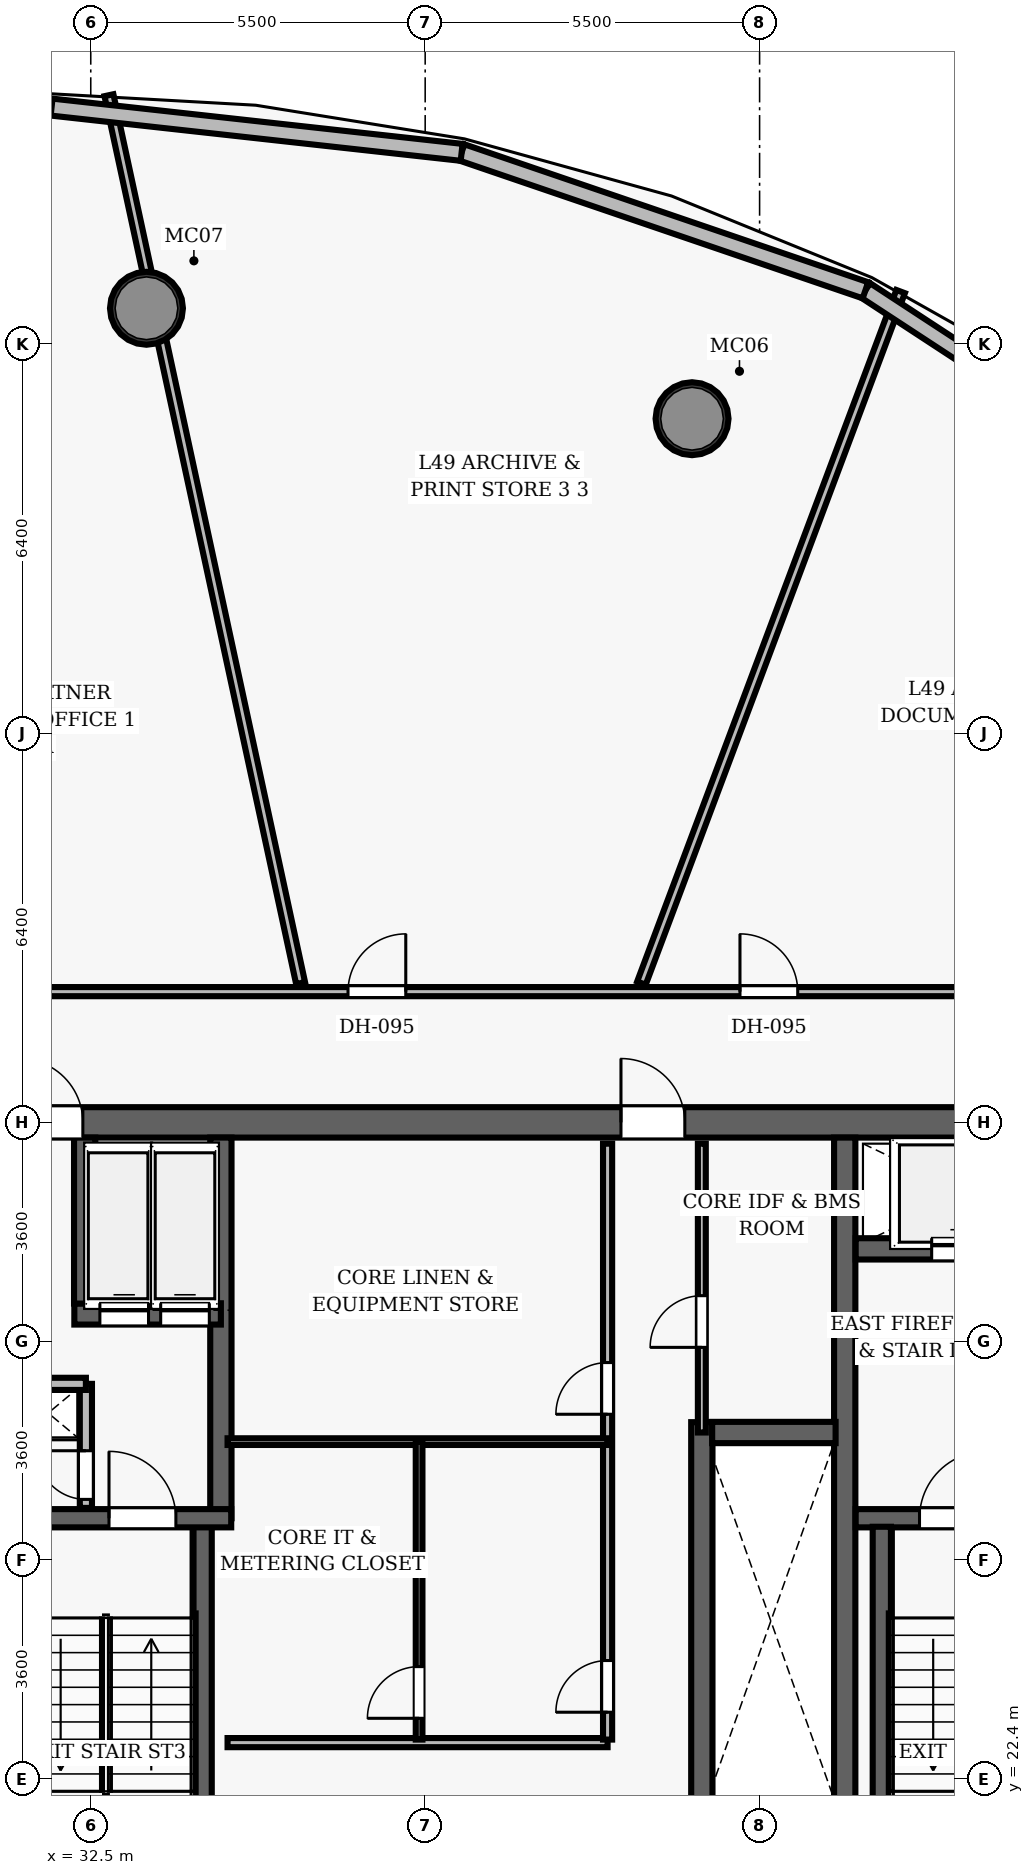
"""IFC4 building model, lengths in metres.
Left out: names, types, materials, properties, quantities, classifications, styles, units other than length and angle.
Written with IfcOpenShell. Run it as: python <this file> out.ifc"""

import sys

from ifc_helpers import new_model, si_unit, direction, frame, frame_2d, origin, origin_2d, place, context, subcontext, project, spatial, rectangle, hollow_circle, extrude, element, fill, save


model = new_model("IFC4")
c1 = context("Model", 3, precision=1e-05, world=origin(), true_north=direction((0.0, 1.0)))
c2 = subcontext(c1, "Body", "Model", "MODEL_VIEW")
j1 = project(units=[si_unit("LENGTHUNIT", "METRE"), si_unit("PLANEANGLEUNIT", "RADIAN")], contexts=[c1])
p1 = place(None, origin())
s1 = spatial("IfcSite", under=j1, at=p1, CompositionType="ELEMENT")
p2 = place(p1, origin())
s2 = spatial("IfcBuilding", under=s1, at=p2, CompositionType="ELEMENT")
p3 = place(p2, frame((0.0, 0.0, 194.3)))
s3 = spatial("IfcBuildingStorey", under=s2, at=p3, CompositionType="ELEMENT", Elevation=194.3)
p4 = place(p3, frame((26.75, 33.2, 0.0), z_axis=(0.0, 0.0, 1.0), x_axis=(1.0, 0.0, 0.0)))
e1 = element("IfcWall", 1, at=p4, inside=s3, PredefinedType="SHEAR", context=c2, shape_type="SweptSolid", body=[
    extrude(rectangle(XDim=22.5, YDim=0.5, at=frame_2d((11.25, 0.0))), origin(), (0.0, 0.0, 1.0), 3.85),
])
p5 = place(p4, frame((4.57, 0.0, 0.0)))
e2 = element("IfcOpeningElement", 2, at=p5, cuts=e1, PredefinedType="OPENING", context=c2, shape_type="SweptSolid", body=[
    extrude(rectangle(XDim=1.05, YDim=2.15, at=frame_2d((0.525, 1.075))), frame((0.0, 0.26, 0.0), z_axis=(0.0, -1.0, 0.0), x_axis=(1.0, 0.0, 0.0)), (0.0, 0.0, 1.0), 0.52),
])
p6 = place(p4, frame((14.47, 0.0, 0.0)))
e3 = element("IfcOpeningElement", 3, at=p6, cuts=e1, PredefinedType="OPENING", context=c2, shape_type="SweptSolid", body=[
    extrude(rectangle(XDim=1.05, YDim=2.15, at=frame_2d((0.525, 1.075))), frame((0.0, 0.26, 0.0), z_axis=(0.0, -1.0, 0.0), x_axis=(1.0, 0.0, 0.0)), (0.0, 0.0, 1.0), 0.52),
])
p7 = place(p3, frame((44.9, 19.05, 0.0), z_axis=(0.0, 0.0, 1.0), x_axis=(0.0, 1.0, 0.0)))
e4 = element("IfcWall", 4, at=p7, inside=s3, PredefinedType="SHEAR", context=c2, shape_type="SweptSolid", body=[
    extrude(rectangle(XDim=13.9, YDim=0.35, at=frame_2d((6.95, 0.0))), origin(), (0.0, 0.0, 1.0), 3.85),
])
for number, where, z_axis, x_axis in (
    (5, (42.389, 44.772, 0.0), (0.0, 0.0, 1.0), (1.0, 0.0, 0.0)),
    (6, (33.416, 46.588, 0.0), (0.0, 0.0, 1.0), (1.0, 0.0, 0.0)),
):
    element("IfcColumn", number, at=place(p3, frame(where, z_axis=z_axis, x_axis=x_axis)), inside=s3, PredefinedType="COLUMN", context=c2, shape_type="SweptSolid", body=[
        extrude(hollow_circle(Radius=0.6, WallThickness=0.05, at=origin_2d()), origin(), (0.0, 0.0, 1.0), 3.85),
    ])
p8 = place(p3, frame((45.08, 26.69, 0.0), z_axis=(0.0, 0.0, 1.0), x_axis=(1.0, 0.0, 0.0)))
e7 = element("IfcWall", 7, at=p8, inside=s3, PredefinedType="SHEAR", context=c2, shape_type="SweptSolid", body=[
    extrude(rectangle(XDim=3.67, YDim=0.3, at=frame_2d((1.835, 0.0))), origin(), (0.0, 0.0, 1.0), 3.85),
])
p9 = place(p8, frame((1.05, 0.0, 0.0)))
e8 = element("IfcOpeningElement", 8, at=p9, cuts=e7, PredefinedType="OPENING", context=c2, shape_type="SweptSolid", body=[
    extrude(rectangle(XDim=1.1, YDim=2.15, at=frame_2d((0.55, 1.075))), frame((0.0, 0.16, 0.0), z_axis=(0.0, -1.0, 0.0), x_axis=(1.0, 0.0, 0.0)), (0.0, 0.0, 1.0), 0.32),
])
p10 = place(p3, frame((45.51, 19.05, 0.0), z_axis=(0.0, 0.0, 1.0), x_axis=(0.0, 1.0, 0.0)))
e9 = element("IfcWall", 9, at=p10, inside=s3, PredefinedType="SHEAR", context=c2, shape_type="SweptSolid", body=[
    extrude(rectangle(XDim=7.5, YDim=0.3, at=frame_2d((3.75, 0.0))), origin(), (0.0, 0.0, 1.0), 3.85),
])
p11 = place(p3, frame((45.08, 31.12, 0.0), z_axis=(0.0, 0.0, 1.0), x_axis=(1.0, 0.0, 0.0)))
e10 = element("IfcWall", 10, at=p11, inside=s3, PredefinedType="SHEAR", context=c2, shape_type="SweptSolid", body=[
    extrude(rectangle(XDim=3.67, YDim=0.35, at=frame_2d((1.835, 0.0))), origin(), (0.0, 0.0, 1.0), 3.035),
])
p12 = place(p11, frame((1.25, 0.0, 0.0)))
e11 = element("IfcOpeningElement", 11, at=p12, cuts=e10, PredefinedType="OPENING", context=c2, shape_type="SweptSolid", body=[
    extrude(rectangle(XDim=1.1, YDim=2.15, at=frame_2d((0.55, 1.075))), frame((0.0, 0.185, 0.0), z_axis=(0.0, -1.0, 0.0), x_axis=(1.0, 0.0, 0.0)), (0.0, 0.0, 1.0), 0.37),
])
p13 = place(p3, frame((34.34, 19.05, 0.0), z_axis=(0.0, 0.0, 1.0), x_axis=(0.0, 1.0, 0.0)))
e12 = element("IfcWall", 12, at=p13, inside=s3, PredefinedType="SHEAR", context=c2, shape_type="SweptSolid", body=[
    extrude(rectangle(XDim=7.5, YDim=0.3, at=frame_2d((3.75, 0.0))), origin(), (0.0, 0.0, 1.0), 3.85),
])
p14 = place(p3, frame((34.64, 26.69, 0.0), z_axis=(0.0, 0.0, 1.0), x_axis=(0.0, 1.0, 0.0)))
e13 = element("IfcWall", 13, at=p14, inside=s3, PredefinedType="SHEAR", context=c2, shape_type="SweptSolid", body=[
    extrude(rectangle(XDim=6.26, YDim=0.35, at=frame_2d((3.13, 0.0))), origin(), (0.0, 0.0, 1.0), 3.85),
])
p15 = place(p3, frame((31.25, 26.69, 0.0), z_axis=(0.0, 0.0, 1.0), x_axis=(1.0, 0.0, 0.0)))
e14 = element("IfcWall", 14, at=p15, inside=s3, PredefinedType="SHEAR", context=c2, shape_type="SweptSolid", body=[
    extrude(rectangle(XDim=3.56, YDim=0.3, at=frame_2d((1.78, 0.0))), origin(), (0.0, 0.0, 1.0), 3.85),
])
p16 = place(p15, frame((1.55, 0.0, 0.0)))
e15 = element("IfcOpeningElement", 15, at=p16, cuts=e14, PredefinedType="OPENING", context=c2, shape_type="SweptSolid", body=[
    extrude(rectangle(XDim=1.1, YDim=2.15, at=frame_2d((0.55, 1.075))), frame((0.0, 0.16, 0.0), z_axis=(0.0, -1.0, 0.0), x_axis=(1.0, 0.0, 0.0)), (0.0, 0.0, 1.0), 0.32),
])
p17 = place(p3, frame((32.23, 30.05, 0.0), z_axis=(0.0, 0.0, 1.0), x_axis=(1.0, 0.0, 0.0)))
e16 = element("IfcWall", 16, at=p17, inside=s3, PredefinedType="SHEAR", context=c2, shape_type="SweptSolid", body=[
    extrude(rectangle(XDim=2.41, YDim=0.35, at=frame_2d((1.205, 0.0))), origin(), (0.0, 0.0, 1.0), 3.035),
])
p18 = place(p17, frame((0.42, 0.0, 0.0)))
e17 = element("IfcOpeningElement", 17, at=p18, cuts=e16, PredefinedType="OPENING", context=c2, shape_type="SweptSolid", body=[
    extrude(rectangle(XDim=0.8, YDim=2.15, at=frame_2d((0.4, 1.075))), frame((0.0, 0.185, 0.0), z_axis=(0.0, -1.0, 0.0), x_axis=(1.0, 0.0, 0.0)), (0.0, 0.0, 1.0), 0.37),
])
p19 = place(p17, frame((1.42, 0.0, 0.0)))
e18 = element("IfcOpeningElement", 18, at=p19, cuts=e16, PredefinedType="OPENING", context=c2, shape_type="SweptSolid", body=[
    extrude(rectangle(XDim=0.8, YDim=2.15, at=frame_2d((0.4, 1.075))), frame((0.0, 0.185, 0.0), z_axis=(0.0, -1.0, 0.0), x_axis=(1.0, 0.0, 0.0)), (0.0, 0.0, 1.0), 0.37),
])
p20 = place(p3, frame((32.4, 30.22, 0.0), z_axis=(0.0, 0.0, 1.0), x_axis=(0.0, 1.0, 0.0)))
e19 = element("IfcWall", 19, at=p20, inside=s3, PredefinedType="SHEAR", context=c2, shape_type="SweptSolid", body=[
    extrude(rectangle(XDim=2.73, YDim=0.35, at=frame_2d((1.365, 0.0))), origin(), (0.0, 0.0, 1.0), 3.035),
])
p21 = place(p3, frame((32.42, 26.86, 0.0), z_axis=(0.0, 0.0, 1.0), x_axis=(0.0, 1.0, 0.0)))
e20 = element("IfcWall", 20, at=p21, inside=s3, PredefinedType="PARTITIONING", context=c2, shape_type="SweptSolid", body=[
    extrude(rectangle(XDim=2.04, YDim=0.2, at=frame_2d((1.02, 0.0))), origin(), (0.0, 0.0, 1.0), 3.035),
])
p22 = place(p21, frame((0.14, 0.0, 0.0)))
e21 = element("IfcOpeningElement", 21, at=p22, cuts=e20, PredefinedType="OPENING", context=c2, shape_type="SweptSolid", body=[
    extrude(rectangle(XDim=0.8, YDim=2.05, at=frame_2d((0.4, 1.025))), frame((0.0, 0.11, 0.0), z_axis=(0.0, -1.0, 0.0), x_axis=(1.0, 0.0, 0.0)), (0.0, 0.0, 1.0), 0.22),
])
p23 = place(p3, frame((31.3, 28.9, 0.0), z_axis=(0.0, 0.0, 1.0), x_axis=(1.0, 0.0, 0.0)))
e22 = element("IfcWall", 22, at=p23, inside=s3, PredefinedType="PARTITIONING", context=c2, shape_type="SweptSolid", body=[
    extrude(rectangle(XDim=1.12, YDim=0.2, at=frame_2d((0.56, 0.0))), origin(), (0.0, 0.0, 1.0), 3.035),
])
p24 = place(p3, frame((42.55, 21.73, 0.0), z_axis=(0.0, 0.0, 1.0), x_axis=(0.0, 1.0, 0.0)))
e23 = element("IfcWall", 23, at=p24, inside=s3, PredefinedType="SHEAR", context=c2, shape_type="SweptSolid", body=[
    extrude(rectangle(XDim=6.54, YDim=0.35, at=frame_2d((3.27, 0.0))), origin(), (0.0, 0.0, 1.0), 3.035),
])
p25 = place(p3, frame((42.72, 28.1, 0.0), z_axis=(0.0, 0.0, 1.0), x_axis=(1.0, 0.0, 0.0)))
e24 = element("IfcWall", 24, at=p25, inside=s3, PredefinedType="SHEAR", context=c2, shape_type="SweptSolid", body=[
    extrude(rectangle(XDim=2.03, YDim=0.35, at=frame_2d((1.015, 0.0))), origin(), (0.0, 0.0, 1.0), 3.035),
])
p26 = place(p3, frame((34.75, 23.0, 0.0), z_axis=(0.0, 0.0, 1.0), x_axis=(1.0, 0.0, 0.0)))
e25 = element("IfcWall", 25, at=p26, inside=s3, PredefinedType="PARTITIONING", context=c2, shape_type="SweptSolid", body=[
    extrude(rectangle(XDim=6.25, YDim=0.15, at=frame_2d((3.125, 0.0))), origin(), (0.0, 0.0, 1.0), 3.035),
])
p27 = place(p3, frame((41.0, 23.05, 0.0), z_axis=(0.0, 0.0, 1.0), x_axis=(0.0, 1.0, 0.0)))
e26 = element("IfcWall", 26, at=p27, inside=s3, PredefinedType="PARTITIONING", context=c2, shape_type="SweptSolid", body=[
    extrude(rectangle(XDim=9.8, YDim=0.15, at=frame_2d((4.9, 0.0))), origin(), (0.0, 0.0, 1.0), 3.035),
])
p28 = place(p27, frame((5.35, 0.0, 0.0)))
e27 = element("IfcOpeningElement", 27, at=p28, cuts=e26, PredefinedType="OPENING", context=c2, shape_type="SweptSolid", body=[
    extrude(rectangle(XDim=0.85, YDim=2.1, at=frame_2d((0.425, 1.05))), frame((0.0, 0.085, 0.0), z_axis=(0.0, -1.0, 0.0), x_axis=(1.0, 0.0, 0.0)), (0.0, 0.0, 1.0), 0.17),
])
p29 = place(p27, frame((0.45, 0.0, 0.0)))
e28 = element("IfcOpeningElement", 28, at=p29, cuts=e26, PredefinedType="OPENING", context=c2, shape_type="SweptSolid", body=[
    extrude(rectangle(XDim=0.85, YDim=2.1, at=frame_2d((0.425, 1.05))), frame((0.0, 0.085, 0.0), z_axis=(0.0, -1.0, 0.0), x_axis=(1.0, 0.0, 0.0)), (0.0, 0.0, 1.0), 0.17),
])
p30 = place(p3, frame((34.75, 27.95, 0.0), z_axis=(0.0, 0.0, 1.0), x_axis=(1.0, 0.0, 0.0)))
e29 = element("IfcWall", 29, at=p30, inside=s3, PredefinedType="PARTITIONING", context=c2, shape_type="SweptSolid", body=[
    extrude(rectangle(XDim=6.25, YDim=0.11, at=frame_2d((3.125, 0.0))), origin(), (0.0, 0.0, 1.0), 3.035),
])
p31 = place(p3, frame((37.9, 23.05, 0.0), z_axis=(0.0, 0.0, 1.0), x_axis=(0.0, 1.0, 0.0)))
e30 = element("IfcWall", 30, at=p31, inside=s3, PredefinedType="PARTITIONING", context=c2, shape_type="SweptSolid", body=[
    extrude(rectangle(XDim=4.9, YDim=0.11, at=frame_2d((2.45, 0.0))), origin(), (0.0, 0.0, 1.0), 3.035),
])
p32 = place(p31, frame((0.35, 0.0, 0.0)))
e31 = element("IfcOpeningElement", 31, at=p32, cuts=e30, PredefinedType="OPENING", context=c2, shape_type="SweptSolid", body=[
    extrude(rectangle(XDim=0.85, YDim=2.1, at=frame_2d((0.425, 1.05))), frame((0.0, 0.065, 0.0), z_axis=(0.0, -1.0, 0.0), x_axis=(1.0, 0.0, 0.0)), (0.0, 0.0, 1.0), 0.13),
])
p33 = place(p3, frame((42.55, 28.1, 0.0), z_axis=(0.0, 0.0, 1.0), x_axis=(0.0, 1.0, 0.0)))
e32 = element("IfcWall", 32, at=p33, inside=s3, PredefinedType="PARTITIONING", context=c2, shape_type="SweptSolid", body=[
    extrude(rectangle(XDim=4.75, YDim=0.13, at=frame_2d((2.375, 0.0))), origin(), (0.0, 0.0, 1.0), 3.035),
])
p34 = place(p33, frame((1.4, 0.0, 0.0)))
e33 = element("IfcOpeningElement", 33, at=p34, cuts=e32, PredefinedType="OPENING", context=c2, shape_type="SweptSolid", body=[
    extrude(rectangle(XDim=0.85, YDim=2.1, at=frame_2d((0.425, 1.05))), frame((0.0, 0.075, 0.0), z_axis=(0.0, -1.0, 0.0), x_axis=(1.0, 0.0, 0.0)), (0.0, 0.0, 1.0), 0.15),
])
p35 = place(p3, frame((24.85, 35.35, 0.0), z_axis=(0.0, 0.0, 1.0), x_axis=(1.0, 0.0, 0.0)))
e34 = element("IfcWall", 34, at=p35, inside=s3, PredefinedType="PARTITIONING", context=c2, shape_type="SweptSolid", body=[
    extrude(rectangle(XDim=26.0, YDim=0.15, at=frame_2d((13.0, 0.0))), origin(), (0.0, 0.0, 1.0), 3.035),
])
p36 = place(p35, frame((18.327, 0.0, 0.0)))
e35 = element("IfcOpeningElement", 35, at=p36, cuts=e34, PredefinedType="OPENING", context=c2, shape_type="SweptSolid", body=[
    extrude(rectangle(XDim=0.95, YDim=2.15, at=frame_2d((0.475, 1.075))), frame((0.0, 0.085, 0.0), z_axis=(0.0, -1.0, 0.0), x_axis=(1.0, 0.0, 0.0)), (0.0, 0.0, 1.0), 0.17),
])
p37 = place(p35, frame((11.881, 0.0, 0.0)))
e36 = element("IfcOpeningElement", 36, at=p37, cuts=e34, PredefinedType="OPENING", context=c2, shape_type="SweptSolid", body=[
    extrude(rectangle(XDim=0.95, YDim=2.15, at=frame_2d((0.475, 1.075))), frame((0.0, 0.085, 0.0), z_axis=(0.0, -1.0, 0.0), x_axis=(1.0, 0.0, 0.0)), (0.0, 0.0, 1.0), 0.17),
])
p38 = place(p35, frame((5.711, 0.0, 0.0)))
e37 = element("IfcOpeningElement", 37, at=p38, cuts=e34, PredefinedType="OPENING", context=c2, shape_type="SweptSolid", body=[
    extrude(rectangle(XDim=0.95, YDim=2.15, at=frame_2d((0.475, 1.075))), frame((0.0, 0.085, 0.0), z_axis=(0.0, -1.0, 0.0), x_axis=(1.0, 0.0, 0.0)), (0.0, 0.0, 1.0), 0.17),
])
p39 = place(p3, frame((41.557, 35.49, 0.0), z_axis=(0.0, 0.0, 1.0), x_axis=(0.350958224888, 0.936391117206, 0.0)))
e38 = element("IfcWall", 38, at=p39, inside=s3, PredefinedType="PARTITIONING", context=c2, shape_type="SweptSolid", body=[
    extrude(rectangle(XDim=12.146, YDim=0.15, at=frame_2d((6.073, 0.0))), origin(), (0.0, 0.0, 1.0), 3.035),
])
p40 = place(p3, frame((35.951, 35.49, 0.0), z_axis=(0.0, 0.0, 1.0), x_axis=(-0.211018834745, 0.977481995426, 0.0)))
e39 = element("IfcWall", 39, at=p40, inside=s3, PredefinedType="PARTITIONING", context=c2, shape_type="SweptSolid", body=[
    extrude(rectangle(XDim=14.939, YDim=0.15, at=frame_2d((7.469, 0.0))), origin(), (0.0, 0.0, 1.0), 3.035),
])
p41 = place(p3, frame((45.24, 46.884, 0.0), z_axis=(0.0, 0.0, 1.0), x_axis=(0.836722302194, -0.547627418059, 0.0)))
e40 = element("IfcWall", 40, at=p41, inside=s3, PredefinedType="SOLIDWALL", context=c2, shape_type="SweptSolid", body=[
    extrude(rectangle(XDim=7.046, YDim=0.28, at=frame_2d((3.523, 0.0))), origin(), (0.0, 0.0, 1.0), 3.62),
])
p42 = place(p3, frame((38.6, 49.152, 0.0), z_axis=(0.0, 0.0, 1.0), x_axis=(0.946319491837, -0.323232763452, 0.0)))
e41 = element("IfcWall", 41, at=p42, inside=s3, PredefinedType="SOLIDWALL", context=c2, shape_type="SweptSolid", body=[
    extrude(rectangle(XDim=7.018, YDim=0.28, at=frame_2d((3.509, 0.0))), origin(), (0.0, 0.0, 1.0), 3.62),
])
p43 = place(p3, frame((31.856, 49.896, 0.0), z_axis=(0.0, 0.0, 1.0), x_axis=(0.993966830352, -0.109681083879, 0.0)))
e42 = element("IfcWall", 42, at=p43, inside=s3, PredefinedType="SOLIDWALL", context=c2, shape_type="SweptSolid", body=[
    extrude(rectangle(XDim=6.785, YDim=0.28, at=frame_2d((3.392, 0.0))), origin(), (0.0, 0.0, 1.0), 3.62),
])
p44 = place(p9, origin())
e43 = element("IfcDoor", 43, at=p44, inside=s3, OperationType="SINGLE_SWING_RIGHT", PredefinedType="DOOR", context=c2, shape_type="SweptSolid", body=[
    extrude(rectangle(XDim=1.1, YDim=2.15, at=frame_2d((0.55, 1.075))), frame((0.0, 0.025, 0.0), z_axis=(0.0, -1.0, 0.0), x_axis=(1.0, 0.0, 0.0)), (0.0, 0.0, 1.0), 0.05),
])
fill(e8, e43)
p45 = place(p16, origin())
e44 = element("IfcDoor", 44, at=p45, inside=s3, OperationType="SINGLE_SWING_LEFT", PredefinedType="DOOR", context=c2, shape_type="SweptSolid", body=[
    extrude(rectangle(XDim=1.1, YDim=2.15, at=frame_2d((0.55, 1.075))), frame((0.0, 0.025, 0.0), z_axis=(0.0, -1.0, 0.0), x_axis=(1.0, 0.0, 0.0)), (0.0, 0.0, 1.0), 0.05),
])
fill(e15, e44)
p46 = place(p22, origin())
e45 = element("IfcDoor", 45, at=p46, inside=s3, OperationType="SINGLE_SWING_RIGHT", PredefinedType="DOOR", context=c2, shape_type="SweptSolid", body=[
    extrude(rectangle(XDim=0.8, YDim=2.05, at=frame_2d((0.4, 1.025))), frame((0.0, 0.025, 0.0), z_axis=(0.0, -1.0, 0.0), x_axis=(1.0, 0.0, 0.0)), (0.0, 0.0, 1.0), 0.05),
])
fill(e21, e45)
p47 = place(p5, origin())
e46 = element("IfcDoor", 46, at=p47, inside=s3, OperationType="SINGLE_SWING_LEFT", PredefinedType="DOOR", context=c2, shape_type="SweptSolid", body=[
    extrude(rectangle(XDim=1.05, YDim=2.15, at=frame_2d((0.525, 1.075))), frame((0.0, 0.025, 0.0), z_axis=(0.0, -1.0, 0.0), x_axis=(1.0, 0.0, 0.0)), (0.0, 0.0, 1.0), 0.05),
])
fill(e2, e46)
p48 = place(p6, origin())
e47 = element("IfcDoor", 47, at=p48, inside=s3, OperationType="SINGLE_SWING_LEFT", PredefinedType="DOOR", context=c2, shape_type="SweptSolid", body=[
    extrude(rectangle(XDim=1.05, YDim=2.15, at=frame_2d((0.525, 1.075))), frame((0.0, 0.025, 0.0), z_axis=(0.0, -1.0, 0.0), x_axis=(1.0, 0.0, 0.0)), (0.0, 0.0, 1.0), 0.05),
])
fill(e3, e47)
p49 = place(p28, origin())
e48 = element("IfcDoor", 48, at=p49, inside=s3, OperationType="SINGLE_SWING_LEFT", PredefinedType="DOOR", context=c2, shape_type="SweptSolid", body=[
    extrude(rectangle(XDim=0.85, YDim=2.1, at=frame_2d((0.425, 1.05))), frame((0.0, 0.025, 0.0), z_axis=(0.0, -1.0, 0.0), x_axis=(1.0, 0.0, 0.0)), (0.0, 0.0, 1.0), 0.05),
])
fill(e27, e48)
p50 = place(p29, origin())
e49 = element("IfcDoor", 49, at=p50, inside=s3, OperationType="SINGLE_SWING_LEFT", PredefinedType="DOOR", context=c2, shape_type="SweptSolid", body=[
    extrude(rectangle(XDim=0.85, YDim=2.1, at=frame_2d((0.425, 1.05))), frame((0.0, 0.025, 0.0), z_axis=(0.0, -1.0, 0.0), x_axis=(1.0, 0.0, 0.0)), (0.0, 0.0, 1.0), 0.05),
])
fill(e28, e49)
p51 = place(p32, origin())
e50 = element("IfcDoor", 50, at=p51, inside=s3, OperationType="SINGLE_SWING_LEFT", PredefinedType="DOOR", context=c2, shape_type="SweptSolid", body=[
    extrude(rectangle(XDim=0.85, YDim=2.1, at=frame_2d((0.425, 1.05))), frame((0.0, 0.025, 0.0), z_axis=(0.0, -1.0, 0.0), x_axis=(1.0, 0.0, 0.0)), (0.0, 0.0, 1.0), 0.05),
])
fill(e31, e50)
p52 = place(p34, origin())
e51 = element("IfcDoor", 51, at=p52, inside=s3, OperationType="SINGLE_SWING_LEFT", PredefinedType="DOOR", context=c2, shape_type="SweptSolid", body=[
    extrude(rectangle(XDim=0.85, YDim=2.1, at=frame_2d((0.425, 1.05))), frame((0.0, 0.025, 0.0), z_axis=(0.0, -1.0, 0.0), x_axis=(1.0, 0.0, 0.0)), (0.0, 0.0, 1.0), 0.05),
])
fill(e33, e51)
p53 = place(p36, origin())
e52 = element("IfcDoor", 52, at=p53, inside=s3, OperationType="SINGLE_SWING_LEFT", PredefinedType="DOOR", context=c2, shape_type="SweptSolid", body=[
    extrude(rectangle(XDim=0.95, YDim=2.15, at=frame_2d((0.475, 1.075))), frame((0.0, 0.025, 0.0), z_axis=(0.0, -1.0, 0.0), x_axis=(1.0, 0.0, 0.0)), (0.0, 0.0, 1.0), 0.05),
])
fill(e35, e52)
p54 = place(p37, origin())
e53 = element("IfcDoor", 53, at=p54, inside=s3, OperationType="SINGLE_SWING_RIGHT", PredefinedType="DOOR", context=c2, shape_type="SweptSolid", body=[
    extrude(rectangle(XDim=0.95, YDim=2.15, at=frame_2d((0.475, 1.075))), frame((0.0, 0.025, 0.0), z_axis=(0.0, -1.0, 0.0), x_axis=(1.0, 0.0, 0.0)), (0.0, 0.0, 1.0), 0.05),
])
fill(e36, e53)
p55 = place(p12, origin())
e54 = element("IfcDoor", 54, at=p55, inside=s3, OperationType="SLIDING_TO_LEFT", PredefinedType="DOOR", context=c2, shape_type="SweptSolid", body=[
    extrude(rectangle(XDim=1.1, YDim=2.15, at=frame_2d((0.55, 1.075))), frame((0.0, 0.025, 0.0), z_axis=(0.0, -1.0, 0.0), x_axis=(1.0, 0.0, 0.0)), (0.0, 0.0, 1.0), 0.05),
])
fill(e11, e54)
p56 = place(p18, origin())
e55 = element("IfcDoor", 55, at=p56, inside=s3, OperationType="SLIDING_TO_LEFT", PredefinedType="DOOR", context=c2, shape_type="SweptSolid", body=[
    extrude(rectangle(XDim=0.8, YDim=2.15, at=frame_2d((0.4, 1.075))), frame((0.0, 0.025, 0.0), z_axis=(0.0, -1.0, 0.0), x_axis=(1.0, 0.0, 0.0)), (0.0, 0.0, 1.0), 0.05),
])
fill(e17, e55)
p57 = place(p19, origin())
e56 = element("IfcDoor", 56, at=p57, inside=s3, OperationType="SLIDING_TO_LEFT", PredefinedType="DOOR", context=c2, shape_type="SweptSolid", body=[
    extrude(rectangle(XDim=0.8, YDim=2.15, at=frame_2d((0.4, 1.075))), frame((0.0, 0.025, 0.0), z_axis=(0.0, -1.0, 0.0), x_axis=(1.0, 0.0, 0.0)), (0.0, 0.0, 1.0), 0.05),
])
fill(e18, e56)
save(model, sys.argv[1])
